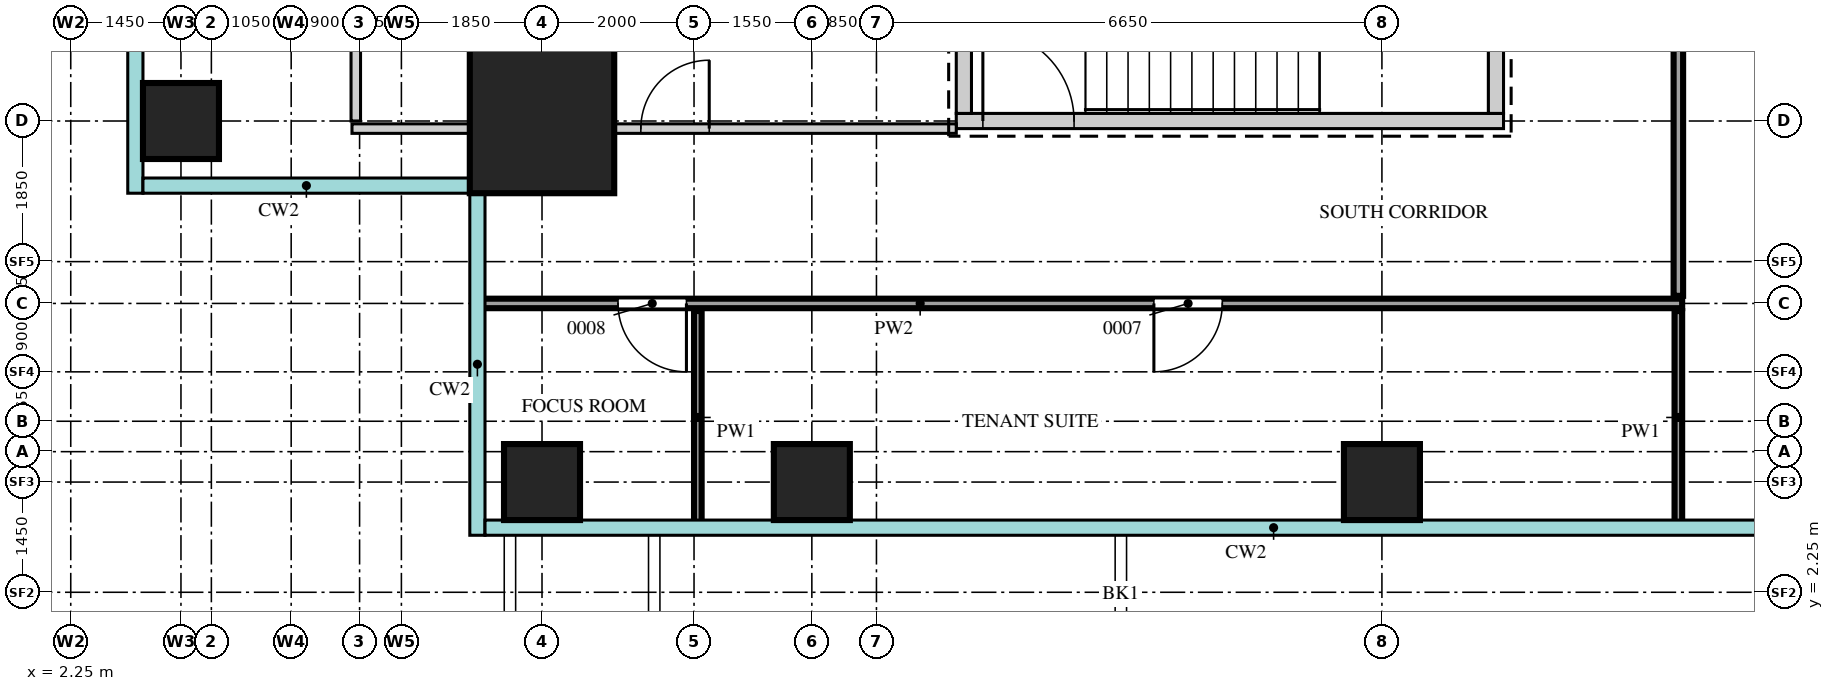
"""IFC4 building model, lengths in metres.
Left out: names, types, materials, properties, quantities, classifications, styles, units other than length and angle.
Written with IfcOpenShell. Run it as: python <this file> out.ifc"""

import sys

from ifc_helpers import new_model, si_unit, direction, frame, frame_2d, origin, origin_2d, place, context, subcontext, project, spatial, rectangle, extrude, source, transform, mapped, element, fill, save


model = new_model("IFC4")
c1 = context("Model", 3, precision=1e-05, world=origin(), true_north=direction((0.0, 1.0)))
c2 = subcontext(c1, "Body", "Model", "MODEL_VIEW")
j1 = project(units=[si_unit("LENGTHUNIT", "METRE"), si_unit("PLANEANGLEUNIT", "RADIAN")], contexts=[c1])
p1 = place(None, origin())
s1 = spatial("IfcSite", under=j1, at=p1, CompositionType="ELEMENT")
p2 = place(p1, origin())
s2 = spatial("IfcBuilding", under=s1, at=p2, CompositionType="ELEMENT")
p3 = place(p2, frame((0.0, 0.0, 184.7)))
s3 = spatial("IfcBuildingStorey", under=s2, at=p3, CompositionType="ELEMENT", Elevation=184.7)
m1 = source(origin(), c2, "Body", "SweptSolid", [
    extrude(rectangle(XDim=7.2, YDim=0.2, at=frame_2d((3.6, 0.0))), origin(), (0.0, 0.0, 1.0), 3.75),
])
p4 = place(p3, frame((13.9, 8.45, 0.0), z_axis=(0.0, 0.0, 1.0), x_axis=(1.0, 0.0, 0.0)))
e1 = element("IfcWall", 1, at=p4, inside=s3, PredefinedType="SHEAR", context=c2, shape_type="MappedRepresentation", body=[
    mapped(m1, transform((0.0, 0.0, 0.0))),
])
m2 = source(origin(), c2, "Body", "SweptSolid", [
    extrude(rectangle(XDim=1.2, YDim=2.1, at=frame_2d((0.6, 1.05))), frame((0.0, 0.11, 0.0), z_axis=(0.0, -1.0, 0.0), x_axis=(1.0, 0.0, 0.0)), (0.0, 0.0, 1.0), 0.22),
])
p5 = place(p4, frame((0.35, 0.0, 0.0)))
e2 = element("IfcOpeningElement", 2, at=p5, cuts=e1, PredefinedType="OPENING", context=c2, shape_type="MappedRepresentation", body=[
    mapped(m2, transform((0.0, 0.0, 0.0))),
])
m3 = source(origin(), c2, "Body", "SweptSolid", [
    extrude(rectangle(XDim=3.35, YDim=0.2, at=frame_2d((1.675, 0.0))), origin(), (0.0, 0.0, 1.0), 3.75),
])
for number, where, z_axis, x_axis in (
    (3, (21.0, 8.55, 0.0), (0.0, 0.0, 1.0), (0.0, 1.0, 0.0)),
    (4, (14.0, 8.55, 0.0), (0.0, 0.0, 1.0), (0.0, 1.0, 0.0)),
):
    element("IfcWall", number, at=place(p3, frame(where, z_axis=z_axis, x_axis=x_axis)), inside=s3, PredefinedType="SHEAR", context=c2, shape_type="MappedRepresentation", body=[
        mapped(m3, transform((0.0, 0.0, 0.0))),
    ])
m4 = source(origin(), c2, "Body", "SweptSolid", [
    extrude(rectangle(XDim=1.9, YDim=1.9, at=origin_2d()), origin(), (0.0, 0.0, 1.0), 4.0),
])
p6 = place(p3, frame((8.45, 8.45, 0.0), z_axis=(0.0, 0.0, 1.0), x_axis=(1.0, 0.0, 0.0)))
e5 = element("IfcColumn", 5, at=p6, inside=s3, PredefinedType="COLUMN", context=c2, shape_type="MappedRepresentation", body=[
    mapped(m4, transform((0.0, 0.0, 0.0))),
])
m5 = source(origin(), c2, "Body", "SweptSolid", [
    extrude(rectangle(XDim=1.0, YDim=1.0, at=origin_2d()), origin(), (0.0, 0.0, 1.0), 3.75),
])
for number, where, z_axis, x_axis in (
    (6, (8.45, 3.7, 0.0), (0.0, 0.0, 1.0), (1.0, 0.0, 0.0)),
    (7, (12.0, 3.7, 0.0), (0.0, 0.0, 1.0), (1.0, 0.0, 0.0)),
    (8, (19.5, 3.7, 0.0), (0.0, 0.0, 1.0), (1.0, 0.0, 0.0)),
    (9, (3.7, 8.45, 0.0), (0.0, 0.0, 1.0), (1.0, 0.0, 0.0)),
):
    element("IfcColumn", number, at=place(p3, frame(where, z_axis=z_axis, x_axis=x_axis)), inside=s3, PredefinedType="COLUMN", context=c2, shape_type="MappedRepresentation", body=[
        mapped(m5, transform((0.0, 0.0, 0.0))),
    ])
m6 = source(origin(), c2, "Body", "SweptSolid", [
    extrude(rectangle(XDim=2.8, YDim=0.1, at=frame_2d((1.4, 0.0))), origin(), (0.0, 0.0, 1.0), 3.8),
])
for number, where, z_axis, x_axis in (
    (10, (10.5, 3.15, 0.0), (0.0, 0.0, 1.0), (0.0, 1.0, 0.0)),
    (11, (23.4, 3.15, 0.0), (0.0, 0.0, 1.0), (0.0, 1.0, 0.0)),
):
    element("IfcWall", number, at=place(p3, frame(where, z_axis=z_axis, x_axis=x_axis)), inside=s3, PredefinedType="PARTITIONING", context=c2, shape_type="MappedRepresentation", body=[
        mapped(m6, transform((0.0, 0.0, 0.0))),
    ])
m7 = source(origin(), c2, "Body", "SweptSolid", [
    extrude(rectangle(XDim=15.8, YDim=0.125, at=frame_2d((7.9, 0.0))), origin(), (0.0, 0.0, 1.0), 3.8),
])
p7 = place(p3, frame((7.65, 6.05, 0.0), z_axis=(0.0, 0.0, 1.0), x_axis=(1.0, 0.0, 0.0)))
e12 = element("IfcWall", 12, at=p7, inside=s3, PredefinedType="PARTITIONING", context=c2, shape_type="MappedRepresentation", body=[
    mapped(m7, transform((0.0, 0.0, 0.0))),
])
m8 = source(origin(), c2, "Body", "SweptSolid", [
    extrude(rectangle(XDim=0.9, YDim=2.1, at=frame_2d((0.45, 1.05))), frame((0.0, 0.073, 0.0), z_axis=(0.0, -1.0, 0.0), x_axis=(1.0, 0.0, 0.0)), (0.0, 0.0, 1.0), 0.145),
])
p8 = place(p7, frame((1.8, 0.0, 0.0)))
e13 = element("IfcOpeningElement", 13, at=p8, cuts=e12, PredefinedType="OPENING", context=c2, shape_type="MappedRepresentation", body=[
    mapped(m8, transform((0.0, 0.0, 0.0))),
])
p9 = place(p7, frame((8.85, 0.0, 0.0)))
e14 = element("IfcOpeningElement", 14, at=p9, cuts=e12, PredefinedType="OPENING", context=c2, shape_type="MappedRepresentation", body=[
    mapped(m8, transform((0.0, 0.0, 0.0))),
])
m9 = source(origin(), c2, "Body", "SweptSolid", [
    extrude(rectangle(XDim=14.75, YDim=0.125, at=frame_2d((7.375, 0.0))), origin(), (0.0, 0.0, 1.0), 3.8),
])
p10 = place(p3, frame((23.4, 6.15, 0.0), z_axis=(0.0, 0.0, 1.0), x_axis=(0.0, 1.0, 0.0)))
e15 = element("IfcWall", 15, at=p10, inside=s3, PredefinedType="PARTITIONING", context=c2, shape_type="MappedRepresentation", body=[
    mapped(m9, transform((0.0, 0.0, 0.0))),
])
p11 = place(p10, frame((7.95, 0.0, 0.0)))
e16 = element("IfcOpeningElement", 16, at=p11, cuts=e15, PredefinedType="OPENING", context=c2, shape_type="MappedRepresentation", body=[
    mapped(m8, transform((0.0, 0.0, 0.0))),
])
m10 = source(origin(), c2, "Body", "SweptSolid", [
    extrude(rectangle(XDim=7.95, YDim=0.125, at=frame_2d((3.975, 0.0))), origin(), (0.0, 0.0, 1.0), 3.25),
])
p12 = place(p3, frame((5.95, 8.35, 0.0), z_axis=(0.0, 0.0, 1.0), x_axis=(1.0, 0.0, 0.0)))
e17 = element("IfcWall", 17, at=p12, inside=s3, PredefinedType="PARTITIONING", context=c2, shape_type="MappedRepresentation", body=[
    mapped(m10, transform((0.0, 0.0, 0.0))),
])
p13 = place(p12, frame((3.8, 0.0, 0.0)))
e18 = element("IfcOpeningElement", 18, at=p13, cuts=e17, PredefinedType="OPENING", context=c2, shape_type="MappedRepresentation", body=[
    mapped(m8, transform((0.0, 0.0, 0.0))),
])
m11 = source(origin(), c2, "Body", "SweptSolid", [
    extrude(rectangle(XDim=4.05, YDim=0.125, at=frame_2d((2.025, 0.0))), origin(), (0.0, 0.0, 1.0), 3.8),
])
p14 = place(p3, frame((6.0, 8.45, 0.0), z_axis=(0.0, 0.0, 1.0), x_axis=(0.0, 1.0, 0.0)))
e19 = element("IfcWall", 19, at=p14, inside=s3, PredefinedType="PARTITIONING", context=c2, shape_type="MappedRepresentation", body=[
    mapped(m11, transform((0.0, 0.0, 0.0))),
])
m12 = source(origin(), c2, "Body", "SweptSolid", [
    extrude(rectangle(XDim=0.9, YDim=2.1, at=frame_2d((0.45, 1.05))), frame((0.0, 0.025, 0.0), z_axis=(0.0, -1.0, 0.0), x_axis=(1.0, 0.0, 0.0)), (0.0, 0.0, 1.0), 0.05),
])
p15 = place(p13, origin())
e20 = element("IfcDoor", 20, at=p15, inside=s3, OperationType="SINGLE_SWING_LEFT", PredefinedType="DOOR", context=c2, shape_type="MappedRepresentation", body=[
    mapped(m12, transform((0.0, 0.0, 0.0))),
])
fill(e18, e20)
p16 = place(p8, origin())
e21 = element("IfcDoor", 21, at=p16, inside=s3, OperationType="SINGLE_SWING_RIGHT", PredefinedType="DOOR", context=c2, shape_type="MappedRepresentation", body=[
    mapped(m12, transform((0.0, 0.0, 0.0))),
])
fill(e13, e21)
p17 = place(p9, origin())
e22 = element("IfcDoor", 22, at=p17, inside=s3, OperationType="SINGLE_SWING_LEFT", PredefinedType="DOOR", context=c2, shape_type="MappedRepresentation", body=[
    mapped(m12, transform((0.0, 0.0, 0.0))),
])
fill(e14, e22)
m13 = source(origin(), c2, "Body", "SweptSolid", [
    extrude(rectangle(XDim=1.2, YDim=2.1, at=frame_2d((0.6, 1.05))), frame((0.0, 0.025, 0.0), z_axis=(0.0, -1.0, 0.0), x_axis=(1.0, 0.0, 0.0)), (0.0, 0.0, 1.0), 0.05),
])
p18 = place(p5, origin())
e23 = element("IfcDoor", 23, at=p18, inside=s3, OperationType="SINGLE_SWING_RIGHT", PredefinedType="DOOR", context=c2, shape_type="MappedRepresentation", body=[
    mapped(m13, transform((0.0, 0.0, 0.0))),
])
fill(e2, e23)
save(model, sys.argv[1])
